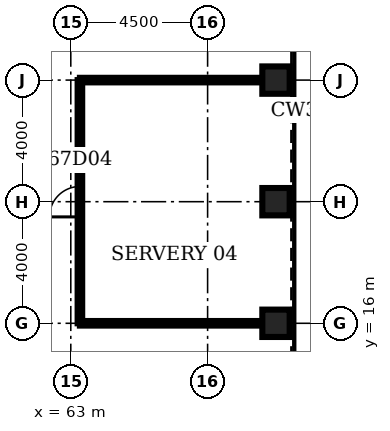
"""IFC4 building model, lengths in metres.
Left out: names, types, materials, properties, quantities, classifications, styles, units other than length and angle.
Written with IfcOpenShell. Run it as: python <this file> out.ifc"""

import sys

from ifc_helpers import new_model, si_unit, direction, frame, frame_2d, origin, origin_2d, place, context, subcontext, project, spatial, rectangle, hollow_rectangle, extrude, element, fill, save


model = new_model("IFC4")
c1 = context("Model", 3, precision=1e-05, world=origin(), true_north=direction((0.0, 1.0)))
c2 = subcontext(c1, "Body", "Model", "MODEL_VIEW")
j1 = project(units=[si_unit("LENGTHUNIT", "METRE"), si_unit("PLANEANGLEUNIT", "RADIAN")], contexts=[c1])
p1 = place(None, origin())
s1 = spatial("IfcSite", under=j1, at=p1, CompositionType="ELEMENT")
p2 = place(p1, origin())
s2 = spatial("IfcBuilding", under=s1, at=p2, CompositionType="ELEMENT")
p3 = place(p2, frame((0.0, 0.0, 296.3)))
s3 = spatial("IfcBuildingStorey", under=s2, at=p3, CompositionType="ELEMENT", Elevation=296.3)
for number, where, z_axis, x_axis in (
    (1, (69.75, 16.0, 0.0), (0.0, 0.0, 1.0), (1.0, 0.0, 0.0)),
    (2, (69.75, 20.0, 0.0), (0.0, 0.0, 1.0), (1.0, 0.0, 0.0)),
    (3, (69.75, 24.0, 0.0), (0.0, 0.0, 1.0), (1.0, 0.0, 0.0)),
):
    element("IfcColumn", number, at=place(p3, frame(where, z_axis=z_axis, x_axis=x_axis)), inside=s3, PredefinedType="COLUMN", context=c2, shape_type="SweptSolid", body=[
        extrude(hollow_rectangle(XDim=0.9, YDim=0.9, WallThickness=0.06, at=origin_2d()), origin(), (0.0, 0.0, 1.0), 4.2),
    ])
for number, where, z_axis, x_axis in (
    (4, (63.3, 16.0, 0.0), (0.0, 0.0, 1.0), (1.0, 0.0, 0.0)),
    (5, (63.3, 24.0, 0.0), (0.0, 0.0, 1.0), (1.0, 0.0, 0.0)),
):
    element("IfcWall", number, at=place(p3, frame(where, z_axis=z_axis, x_axis=x_axis)), inside=s3, PredefinedType="PARTITIONING", context=c2, shape_type="SweptSolid", body=[
        extrude(rectangle(XDim=6.0, YDim=0.15, at=frame_2d((3.0, 0.0))), origin(), (0.0, 0.0, 1.0), 3.0),
    ])
p4 = place(p3, frame((63.3, 16.0, 0.0), z_axis=(0.0, 0.0, 1.0), x_axis=(0.0, 1.0, 0.0)))
e6 = element("IfcWall", 6, at=p4, inside=s3, PredefinedType="PARTITIONING", context=c2, shape_type="SweptSolid", body=[
    extrude(rectangle(XDim=8.0, YDim=0.15, at=frame_2d((4.0, 0.0))), origin(), (0.0, 0.0, 1.0), 3.0),
])
p5 = place(p4, frame((3.5, 0.0, 0.0)))
e7 = element("IfcOpeningElement", 7, at=p5, cuts=e6, PredefinedType="OPENING", context=c2, shape_type="SweptSolid", body=[
    extrude(rectangle(XDim=1.0, YDim=2.1, at=frame_2d((0.5, 1.05))), frame((0.0, 0.085, 0.0), z_axis=(0.0, -1.0, 0.0), x_axis=(1.0, 0.0, 0.0)), (0.0, 0.0, 1.0), 0.17),
])
p6 = place(p5, origin())
e8 = element("IfcDoor", 8, at=p6, inside=s3, OperationType="SINGLE_SWING_LEFT", PredefinedType="DOOR", context=c2, shape_type="SweptSolid", body=[
    extrude(rectangle(XDim=1.0, YDim=2.1, at=frame_2d((0.5, 1.05))), frame((0.0, 0.025, 0.0), z_axis=(0.0, -1.0, 0.0), x_axis=(1.0, 0.0, 0.0)), (0.0, 0.0, 1.0), 0.05),
])
fill(e7, e8)
save(model, sys.argv[1])
